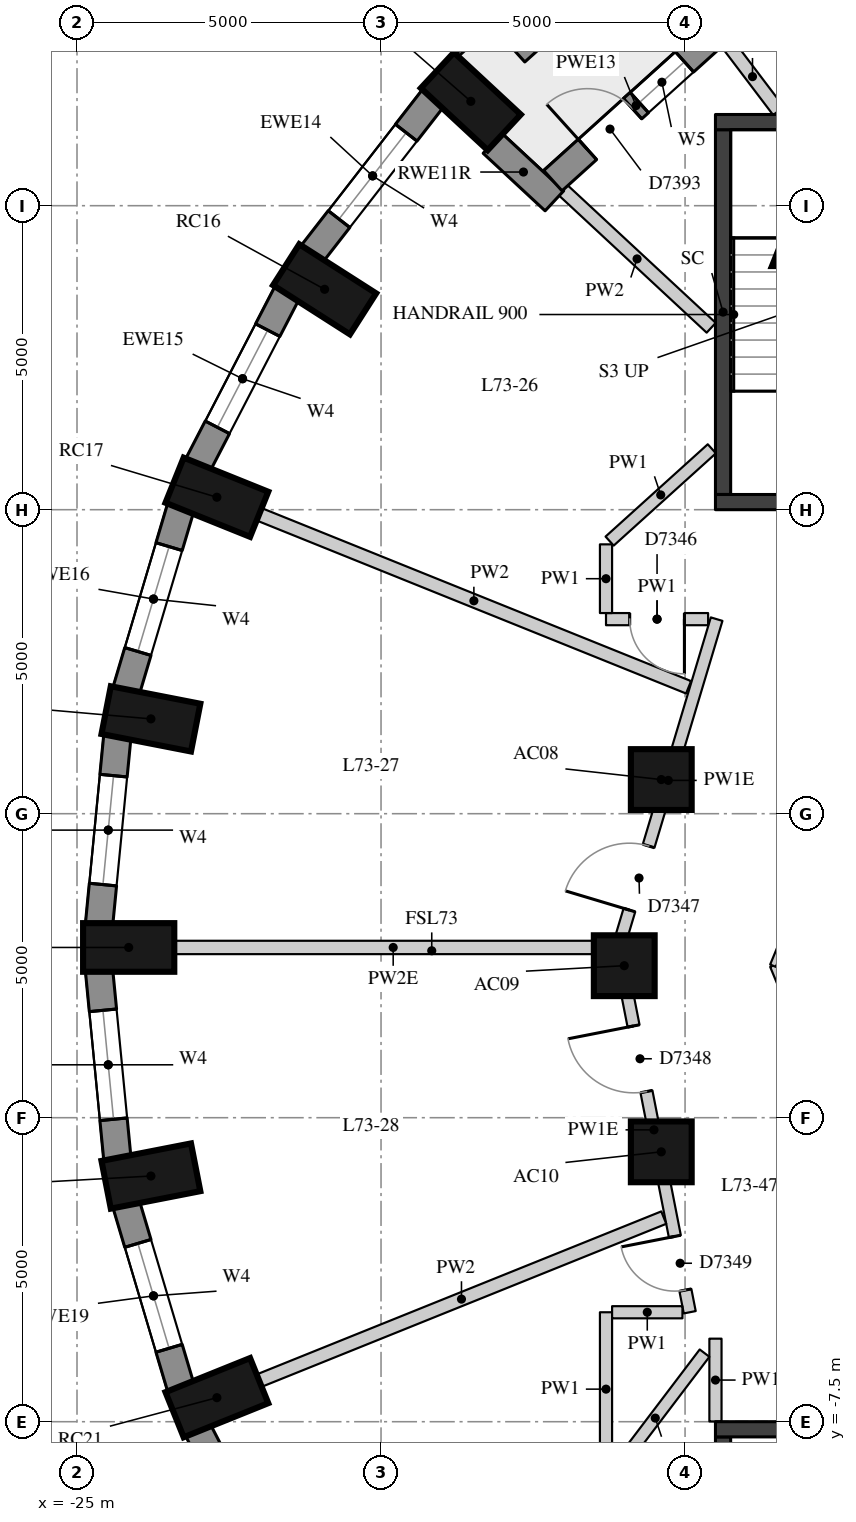
"""IFC4 building model, lengths in metres.
Left out: names, types, materials, properties, quantities, classifications, styles, units other than length and angle.
Written with IfcOpenShell. Run it as: python <this file> out.ifc"""

import sys

from ifc_helpers import new_model, si_unit, direction, frame, frame_2d, origin, origin_2d, place, context, subcontext, project, spatial, rectangle, extrude, element, fill, save


model = new_model("IFC4")
c1 = context("Model", 3, precision=1e-05, world=origin(), true_north=direction((0.0, 1.0)))
c2 = subcontext(c1, "Body", "Model", "MODEL_VIEW")
j1 = project(units=[si_unit("LENGTHUNIT", "METRE"), si_unit("PLANEANGLEUNIT", "RADIAN")], contexts=[c1])
p1 = place(None, origin())
s1 = spatial("IfcSite", under=j1, at=p1, CompositionType="ELEMENT")
p2 = place(p1, origin())
s2 = spatial("IfcBuilding", under=s1, at=p2, CompositionType="ELEMENT")
p3 = place(p2, frame((0.0, 0.0, 256.4)))
s3 = spatial("IfcBuildingStorey", under=s2, at=p3, CompositionType="ELEMENT", Elevation=256.4)
for number, where, z_axis, x_axis in (
    (1, (-18.523, 14.216, 0.0), (0.0, 0.0, 1.0), (-0.733, 0.681, 0.0)),
    (2, (-20.928, 11.125, 0.0), (0.0, 0.0, 1.0), (-0.843, 0.539, 0.0)),
    (3, (-22.7, 7.705, 0.0), (0.0, 0.0, 1.0), (-0.928, 0.374, 0.0)),
    (4, (-23.785, 4.06, 0.0), (0.0, 0.0, 1.0), (-0.981, 0.192, 0.0)),
    (5, (-24.15, 0.3, 0.0), (0.0, 0.0, 1.0), (-1.0, 0.0, 0.0)),
    (6, (-23.785, -3.459, 0.0), (0.0, 0.0, 1.0), (-0.981, -0.192, 0.0)),
    (7, (-22.7, -7.105, 0.0), (0.0, 0.0, 1.0), (-0.928, -0.374, 0.0)),
):
    element("IfcColumn", number, at=place(p3, frame(where, z_axis=z_axis, x_axis=x_axis)), inside=s3, PredefinedType="COLUMN", context=c2, shape_type="SweptSolid", body=[
        extrude(rectangle(XDim=1.5, YDim=0.8, at=origin_2d()), origin(), (0.0, 0.0, 1.0), 3.3),
    ])
for number, where, z_axis, x_axis in (
    (8, (-15.391, 3.062, 0.0), (0.0, 0.0, 1.0), (1.0, 0.0, 0.0)),
    (9, (-16.0, 0.0, 0.0), (0.0, 0.0, 1.0), (1.0, 0.0, 0.0)),
    (10, (-15.391, -3.062, 0.0), (0.0, 0.0, 1.0), (1.0, 0.0, 0.0)),
):
    element("IfcColumn", number, at=place(p3, frame(where, z_axis=z_axis, x_axis=x_axis)), inside=s3, PredefinedType="COLUMN", context=c2, shape_type="SweptSolid", body=[
        extrude(rectangle(XDim=1.0, YDim=1.0, at=origin_2d()), origin(), (0.0, 0.0, 1.0), 3.3),
    ])
p4 = place(p3, frame((-19.142, 14.272, 0.0), z_axis=(0.0, 0.0, 1.0), x_axis=(-0.613862536705, -0.789412937587, 0.0)))
e11 = element("IfcWall", 11, at=p4, inside=s3, PredefinedType="SOLIDWALL", context=c2, shape_type="SweptSolid", body=[
    extrude(rectangle(XDim=3.247, YDim=0.45, at=frame_2d((1.624, 0.0))), origin(), (0.0, 0.0, 1.0), 2.95),
])
p5 = place(p4, frame((0.724, 0.0, 0.4)))
e12 = element("IfcOpeningElement", 12, at=p5, cuts=e11, PredefinedType="OPENING", context=c2, shape_type="SweptSolid", body=[
    extrude(rectangle(XDim=1.8, YDim=1.75, at=frame_2d((0.9, 0.875))), frame((0.0, 0.235, 0.0), z_axis=(0.0, -1.0, 0.0), x_axis=(1.0, 0.0, 0.0)), (0.0, 0.0, 1.0), 0.47),
])
p6 = place(p3, frame((-21.545, 11.068, 0.0), z_axis=(0.0, 0.0, 1.0), x_axis=(-0.459889857669, -0.887975967475, 0.0)))
e13 = element("IfcWall", 13, at=p6, inside=s3, PredefinedType="SOLIDWALL", context=c2, shape_type="SweptSolid", body=[
    extrude(rectangle(XDim=3.186, YDim=0.45, at=frame_2d((1.593, 0.0))), origin(), (0.0, 0.0, 1.0), 2.95),
])
p7 = place(p6, frame((0.693, 0.0, 0.4)))
e14 = element("IfcOpeningElement", 14, at=p7, cuts=e13, PredefinedType="OPENING", context=c2, shape_type="SweptSolid", body=[
    extrude(rectangle(XDim=1.8, YDim=1.75, at=frame_2d((0.9, 0.875))), frame((0.0, 0.235, 0.0), z_axis=(0.0, -1.0, 0.0), x_axis=(1.0, 0.0, 0.0)), (0.0, 0.0, 1.0), 0.47),
])
p8 = place(p3, frame((-23.294, 7.535, 0.0), z_axis=(0.0, 0.0, 1.0), x_axis=(-0.285263800865, -0.958449040855, 0.0)))
e15 = element("IfcWall", 15, at=p8, inside=s3, PredefinedType="SOLIDWALL", context=c2, shape_type="SweptSolid", body=[
    extrude(rectangle(XDim=3.139, YDim=0.45, at=frame_2d((1.57, 0.0))), origin(), (0.0, 0.0, 1.0), 2.95),
])
p9 = place(p8, frame((0.67, 0.0, 0.4)))
e16 = element("IfcOpeningElement", 16, at=p9, cuts=e15, PredefinedType="OPENING", context=c2, shape_type="SweptSolid", body=[
    extrude(rectangle(XDim=1.8, YDim=1.75, at=frame_2d((0.9, 0.875))), frame((0.0, 0.235, 0.0), z_axis=(0.0, -1.0, 0.0), x_axis=(1.0, 0.0, 0.0)), (0.0, 0.0, 1.0), 0.47),
])
p10 = place(p3, frame((-24.336, 3.78, 0.0), z_axis=(0.0, 0.0, 1.0), x_axis=(-0.096740086873, -0.995309678237, 0.0)))
e17 = element("IfcWall", 17, at=p10, inside=s3, PredefinedType="SOLIDWALL", context=c2, shape_type="SweptSolid", body=[
    extrude(rectangle(XDim=3.114, YDim=0.45, at=frame_2d((1.557, 0.0))), origin(), (0.0, 0.0, 1.0), 2.95),
])
p11 = place(p10, frame((0.657, 0.0, 0.4)))
e18 = element("IfcOpeningElement", 18, at=p11, cuts=e17, PredefinedType="OPENING", context=c2, shape_type="SweptSolid", body=[
    extrude(rectangle(XDim=1.8, YDim=1.75, at=frame_2d((0.9, 0.875))), frame((0.0, 0.235, 0.0), z_axis=(0.0, -1.0, 0.0), x_axis=(1.0, 0.0, 0.0)), (0.0, 0.0, 1.0), 0.47),
])
p12 = place(p3, frame((-24.637, -0.08, 0.0), z_axis=(0.0, 0.0, 1.0), x_axis=(0.09673253904, -0.995310411827, 0.0)))
e19 = element("IfcWall", 19, at=p12, inside=s3, PredefinedType="SOLIDWALL", context=c2, shape_type="SweptSolid", body=[
    extrude(rectangle(XDim=3.115, YDim=0.45, at=frame_2d((1.557, 0.0))), origin(), (0.0, 0.0, 1.0), 2.95),
])
p13 = place(p12, frame((0.657, 0.0, 0.4)))
e20 = element("IfcOpeningElement", 20, at=p13, cuts=e19, PredefinedType="OPENING", context=c2, shape_type="SweptSolid", body=[
    extrude(rectangle(XDim=1.8, YDim=1.75, at=frame_2d((0.9, 0.875))), frame((0.0, 0.235, 0.0), z_axis=(0.0, -1.0, 0.0), x_axis=(1.0, 0.0, 0.0)), (0.0, 0.0, 1.0), 0.47),
])
p14 = place(p3, frame((-24.19, -3.926, 0.0), z_axis=(0.0, 0.0, 1.0), x_axis=(0.285263800865, -0.958449040855, 0.0)))
e21 = element("IfcWall", 21, at=p14, inside=s3, PredefinedType="SOLIDWALL", context=c2, shape_type="SweptSolid", body=[
    extrude(rectangle(XDim=3.139, YDim=0.45, at=frame_2d((1.57, 0.0))), origin(), (0.0, 0.0, 1.0), 2.95),
])
p15 = place(p14, frame((0.67, 0.0, 0.4)))
e22 = element("IfcOpeningElement", 22, at=p15, cuts=e21, PredefinedType="OPENING", context=c2, shape_type="SweptSolid", body=[
    extrude(rectangle(XDim=1.8, YDim=1.75, at=frame_2d((0.9, 0.875))), frame((0.0, 0.235, 0.0), z_axis=(0.0, -1.0, 0.0), x_axis=(1.0, 0.0, 0.0)), (0.0, 0.0, 1.0), 0.47),
])
p16 = place(p3, frame((-23.01, -7.64, 0.0), z_axis=(0.0, 0.0, 1.0), x_axis=(0.459921155255, -0.887959757505, 0.0)))
e23 = element("IfcWall", 23, at=p16, inside=s3, PredefinedType="SOLIDWALL", context=c2, shape_type="SweptSolid", body=[
    extrude(rectangle(XDim=3.186, YDim=0.45, at=frame_2d((1.593, 0.0))), origin(), (0.0, 0.0, 1.0), 2.95),
])
p17 = place(p16, frame((0.693, 0.0, 0.4)))
e24 = element("IfcOpeningElement", 24, at=p17, cuts=e23, PredefinedType="OPENING", context=c2, shape_type="SweptSolid", body=[
    extrude(rectangle(XDim=1.8, YDim=1.75, at=frame_2d((0.9, 0.875))), frame((0.0, 0.235, 0.0), z_axis=(0.0, -1.0, 0.0), x_axis=(1.0, 0.0, 0.0)), (0.0, 0.0, 1.0), 0.47),
])
p18 = place(p3, frame((-18.167, 13.527, 0.0), z_axis=(0.0, 0.0, 1.0), x_axis=(0.732693451389, -0.680558819127, 0.0)))
e25 = element("IfcWall", 25, at=p18, inside=s3, PredefinedType="SOLIDWALL", context=c2, shape_type="SweptSolid", body=[
    extrude(rectangle(XDim=1.391, YDim=0.45, at=frame_2d((0.695, 0.0))), origin(), (0.0, 0.0, 1.0), 2.95),
])
p19 = place(p3, frame((-14.441, 15.38, 0.0), z_axis=(0.0, 0.0, 1.0), x_axis=(-0.742152631569, -0.670230909057, 0.0)))
e26 = element("IfcWall", 26, at=p19, inside=s3, PredefinedType="SOLIDWALL", context=c2, shape_type="SweptSolid", body=[
    extrude(rectangle(XDim=3.683, YDim=0.45, at=frame_2d((1.842, 0.0))), origin(), (0.0, 0.0, 1.0), 2.95),
])
p20 = place(p19, frame((0.767, 0.0, 0.4)))
e27 = element("IfcOpeningElement", 27, at=p20, cuts=e26, PredefinedType="OPENING", context=c2, shape_type="SweptSolid", body=[
    extrude(rectangle(XDim=1.0, YDim=1.75, at=frame_2d((0.5, 0.875))), frame((0.0, 0.235, 0.0), z_axis=(0.0, -1.0, 0.0), x_axis=(1.0, 0.0, 0.0)), (0.0, 0.0, 1.0), 0.47),
])
p21 = place(p19, frame((1.917, 0.0, 0.0)))
e28 = element("IfcOpeningElement", 28, at=p21, cuts=e26, PredefinedType="OPENING", context=c2, shape_type="SweptSolid", body=[
    extrude(rectangle(XDim=1.0, YDim=2.15, at=frame_2d((0.5, 1.075))), frame((0.0, 0.235, 0.0), z_axis=(0.0, -1.0, 0.0), x_axis=(1.0, 0.0, 0.0)), (0.0, 0.0, 1.0), 0.47),
])
p22 = place(p3, frame((-16.532, 16.328, 0.0), z_axis=(0.0, 0.0, 1.0), x_axis=(-0.743098542319, -0.669182005439, 0.0)))
e29 = element("IfcWall", 29, at=p22, inside=s3, PredefinedType="USERDEFINED", context=c2, shape_type="SweptSolid", body=[
    extrude(rectangle(XDim=1.8, YDim=0.7, at=frame_2d((0.9, 0.0))), origin(), (0.0, 0.0, 1.0), 0.75),
])
p23 = place(p3, frame((-14.375, 7.75, -0.28), z_axis=(0.0, 0.0, 1.0), x_axis=(0.0, 1.0, 0.0)))
e30 = element("IfcWall", 30, at=p23, inside=s3, PredefinedType="SHEAR", context=c2, shape_type="SweptSolid", body=[
    extrude(rectangle(XDim=6.0, YDim=0.25, at=frame_2d((3.0, 0.0))), origin(), (0.0, 0.0, 1.0), 3.23),
])
for number, where, z_axis, x_axis in (
    (31, (-14.5, 13.875, -0.28), (0.0, 0.0, 1.0), (1.0, 0.0, 0.0)),
    (32, (-14.5, 7.625, -0.28), (0.0, 0.0, 1.0), (1.0, 0.0, 0.0)),
):
    element("IfcWall", number, at=place(p3, frame(where, z_axis=z_axis, x_axis=x_axis)), inside=s3, PredefinedType="SHEAR", context=c2, shape_type="SweptSolid", body=[
        extrude(rectangle(XDim=5.2, YDim=0.25, at=frame_2d((2.6, 0.0))), origin(), (0.0, 0.0, 1.0), 3.23),
    ])
p24 = place(p3, frame((-14.375, -13.75, -0.28), z_axis=(0.0, 0.0, 1.0), x_axis=(0.0, 1.0, 0.0)))
e33 = element("IfcWall", 33, at=p24, inside=s3, PredefinedType="SHEAR", context=c2, shape_type="SweptSolid", body=[
    extrude(rectangle(XDim=6.0, YDim=0.25, at=frame_2d((3.0, 0.0))), origin(), (0.0, 0.0, 1.0), 3.23),
])
p25 = place(p3, frame((-14.5, -7.625, -0.28), z_axis=(0.0, 0.0, 1.0), x_axis=(1.0, 0.0, 0.0)))
e34 = element("IfcWall", 34, at=p25, inside=s3, PredefinedType="SHEAR", context=c2, shape_type="SweptSolid", body=[
    extrude(rectangle(XDim=5.2, YDim=0.25, at=frame_2d((2.6, 0.0))), origin(), (0.0, 0.0, 1.0), 3.23),
])
p26 = place(p3, frame((-14.923, -5.7, 0.0), z_axis=(0.0, 0.0, 1.0), x_axis=(-0.192536596074, 0.981289793676, 0.0)))
e35 = element("IfcWall", 35, at=p26, inside=s3, PredefinedType="PARTITIONING", context=c2, shape_type="SweptSolid", body=[
    extrude(rectangle(XDim=6.115, YDim=0.2, at=frame_2d((3.057, 0.0))), origin(), (0.0, 0.0, 1.0), 2.45),
])
p27 = place(p26, frame((3.699, 0.0, 0.0)))
e36 = element("IfcOpeningElement", 36, at=p27, cuts=e35, PredefinedType="OPENING", context=c2, shape_type="SweptSolid", body=[
    extrude(rectangle(XDim=1.1, YDim=2.1, at=frame_2d((0.55, 1.05))), frame((0.0, 0.11, 0.0), z_axis=(0.0, -1.0, 0.0), x_axis=(1.0, 0.0, 0.0)), (0.0, 0.0, 1.0), 0.22),
])
p28 = place(p26, frame((0.372, 0.0, 0.0)))
e37 = element("IfcOpeningElement", 37, at=p28, cuts=e35, PredefinedType="OPENING", context=c2, shape_type="SweptSolid", body=[
    extrude(rectangle(XDim=0.9, YDim=2.1, at=frame_2d((0.45, 1.05))), frame((0.0, 0.11, 0.0), z_axis=(0.0, -1.0, 0.0), x_axis=(1.0, 0.0, 0.0)), (0.0, 0.0, 1.0), 0.22),
])
p29 = place(p3, frame((-16.071, 0.395, 0.0), z_axis=(0.0, 0.0, 1.0), x_axis=(0.287129472402, 0.957891782029, 0.0)))
e38 = element("IfcWall", 38, at=p29, inside=s3, PredefinedType="PARTITIONING", context=c2, shape_type="SweptSolid", body=[
    extrude(rectangle(XDim=5.538, YDim=0.2, at=frame_2d((2.769, 0.0))), origin(), (0.0, 0.0, 1.0), 2.45),
])
p30 = place(p29, frame((0.543, 0.0, 0.0)))
e39 = element("IfcOpeningElement", 39, at=p30, cuts=e38, PredefinedType="OPENING", context=c2, shape_type="SweptSolid", body=[
    extrude(rectangle(XDim=1.1, YDim=2.1, at=frame_2d((0.55, 1.05))), frame((0.0, 0.11, 0.0), z_axis=(0.0, -1.0, 0.0), x_axis=(1.0, 0.0, 0.0)), (0.0, 0.0, 1.0), 0.22),
])
p31 = place(p3, frame((-14.621, 5.7, 0.0), z_axis=(0.0, 0.0, 1.0), x_axis=(-1.0, 0.0, 0.0)))
e40 = element("IfcWall", 40, at=p31, inside=s3, PredefinedType="PARTITIONING", context=c2, shape_type="SweptSolid", body=[
    extrude(rectangle(XDim=1.679, YDim=0.2, at=frame_2d((0.84, 0.0))), origin(), (0.0, 0.0, 1.0), 2.95),
])
p32 = place(p31, frame((0.39, 0.0, 0.0)))
e41 = element("IfcOpeningElement", 41, at=p32, cuts=e40, PredefinedType="OPENING", context=c2, shape_type="SweptSolid", body=[
    extrude(rectangle(XDim=0.9, YDim=2.1, at=frame_2d((0.45, 1.05))), frame((0.0, 0.11, 0.0), z_axis=(0.0, -1.0, 0.0), x_axis=(1.0, 0.0, 0.0)), (0.0, 0.0, 1.0), 0.22),
])
p33 = place(p3, frame((-16.3, 5.8, 0.0), z_axis=(0.0, 0.0, 1.0), x_axis=(0.0, 1.0, 0.0)))
e42 = element("IfcWall", 42, at=p33, inside=s3, PredefinedType="PARTITIONING", context=c2, shape_type="SweptSolid", body=[
    extrude(rectangle(XDim=1.13, YDim=0.2, at=frame_2d((0.565, 0.0))), origin(), (0.0, 0.0, 1.0), 2.95),
])
p34 = place(p3, frame((-16.24, 6.984, 0.0), z_axis=(0.0, 0.0, 1.0), x_axis=(0.742140692687, 0.67024412885, 0.0)))
e43 = element("IfcWall", 43, at=p34, inside=s3, PredefinedType="PARTITIONING", context=c2, shape_type="SweptSolid", body=[
    extrude(rectangle(XDim=2.265, YDim=0.2, at=frame_2d((1.132, 0.0))), origin(), (0.0, 0.0, 1.0), 2.95),
])
p35 = place(p3, frame((-14.5, -7.496, 0.0), z_axis=(0.0, 0.0, 1.0), x_axis=(0.0, 1.0, 0.0)))
e44 = element("IfcWall", 44, at=p35, inside=s3, PredefinedType="PARTITIONING", context=c2, shape_type="SweptSolid", body=[
    extrude(rectangle(XDim=1.362, YDim=0.2, at=frame_2d((0.681, 0.0))), origin(), (0.0, 0.0, 1.0), 2.95),
])
p36 = place(p3, frame((-14.679, -6.372, 0.0), z_axis=(0.0, 0.0, 1.0), x_axis=(-0.604258962547, -0.796787993247, 0.0)))
e45 = element("IfcWall", 45, at=p36, inside=s3, PredefinedType="PARTITIONING", context=c2, shape_type="SweptSolid", body=[
    extrude(rectangle(XDim=2.682, YDim=0.2, at=frame_2d((1.341, 0.0))), origin(), (0.0, 0.0, 1.0), 2.95),
])
p37 = place(p3, frame((-16.3, -8.229, 0.0), z_axis=(0.0, 0.0, 1.0), x_axis=(0.0, 1.0, 0.0)))
e46 = element("IfcWall", 46, at=p37, inside=s3, PredefinedType="PARTITIONING", context=c2, shape_type="SweptSolid", body=[
    extrude(rectangle(XDim=2.529, YDim=0.2, at=frame_2d((1.265, 0.0))), origin(), (0.0, 0.0, 1.0), 2.95),
])
p38 = place(p3, frame((-16.2, -5.7, 0.0), z_axis=(0.0, 0.0, 1.0), x_axis=(1.0, 0.0, 0.0)))
e47 = element("IfcWall", 47, at=p38, inside=s3, PredefinedType="PARTITIONING", context=c2, shape_type="SweptSolid", body=[
    extrude(rectangle(XDim=1.157, YDim=0.2, at=frame_2d((0.579, 0.0))), origin(), (0.0, 0.0, 1.0), 2.95),
])
p39 = place(p3, frame((-14.319, 15.187, 0.0), z_axis=(0.0, 0.0, 1.0), x_axis=(0.603937349714, -0.797031792101, 0.0)))
e48 = element("IfcWall", 48, at=p39, inside=s3, PredefinedType="PARTITIONING", context=c2, shape_type="SweptSolid", body=[
    extrude(rectangle(XDim=1.416, YDim=0.22, at=frame_2d((0.708, 0.0))), origin(), (0.0, 0.0, 1.0), 2.5),
])
p40 = place(p3, frame((-17.009, 12.758, 0.0), z_axis=(0.0, 0.0, 1.0), x_axis=(0.732631495403, -0.680625515202, 0.0)))
e49 = element("IfcWall", 49, at=p40, inside=s3, PredefinedType="PARTITIONING", context=c2, shape_type="SweptSolid", body=[
    extrude(rectangle(XDim=3.328, YDim=0.22, at=frame_2d((1.664, 0.0))), origin(), (0.0, 0.0, 1.0), 2.95),
])
p41 = place(p3, frame((-22.004, 7.424, 0.0), z_axis=(0.0, 0.0, 1.0), x_axis=(0.927533826991, -0.373739213607, 0.0)))
e50 = element("IfcWall", 50, at=p41, inside=s3, PredefinedType="PARTITIONING", context=c2, shape_type="SweptSolid", body=[
    extrude(rectangle(XDim=7.614, YDim=0.22, at=frame_2d((3.807, 0.0))), origin(), (0.0, 0.0, 1.0), 2.95),
])
p42 = place(p3, frame((-23.4, 0.3, 0.0), z_axis=(0.0, 0.0, 1.0), x_axis=(1.0, 0.0, 0.0)))
e51 = element("IfcWall", 51, at=p42, inside=s3, PredefinedType="PARTITIONING", context=c2, shape_type="SweptSolid", body=[
    extrude(rectangle(XDim=7.2, YDim=0.22, at=frame_2d((3.6, 0.0))), origin(), (0.0, 0.0, 1.0), 2.4),
])
p43 = place(p3, frame((-22.004, -6.824, 0.0), z_axis=(0.0, 0.0, 1.0), x_axis=(0.927530164265, 0.373748303513, 0.0)))
e52 = element("IfcWall", 52, at=p43, inside=s3, PredefinedType="PARTITIONING", context=c2, shape_type="SweptSolid", body=[
    extrude(rectangle(XDim=7.174, YDim=0.22, at=frame_2d((3.587, 0.0))), origin(), (0.0, 0.0, 1.0), 2.95),
])
for number, where, z_axis, x_axis in (
    (53, (-11.927, -3.927, 0.0), (0.0, 0.0, 1.0), (-0.383, 0.924, 0.0)),
    (54, (-13.554, 0.0, 0.0), (0.0, 0.0, 1.0), (0.383, 0.924, 0.0)),
):
    element("IfcWall", number, at=place(p3, frame(where, z_axis=z_axis, x_axis=x_axis)), inside=s3, PredefinedType="PARTITIONING", context=c2, shape_type="SweptSolid", body=[
        extrude(rectangle(XDim=4.251, YDim=0.1, at=frame_2d((2.125, 0.0))), origin(), (0.0, 0.0, 1.0), 2.95),
    ])
p44 = place(p5, origin())
e55 = element("IfcWindow", 55, at=p44, inside=s3, PartitioningType="SINGLE_PANEL", PredefinedType="WINDOW", context=c2, shape_type="SweptSolid", body=[
    extrude(rectangle(XDim=1.8, YDim=1.75, at=frame_2d((0.9, 0.875))), frame((0.0, 0.035, 0.0), z_axis=(0.0, -1.0, 0.0), x_axis=(1.0, 0.0, 0.0)), (0.0, 0.0, 1.0), 0.06),
])
fill(e12, e55)
p45 = place(p7, origin())
e56 = element("IfcWindow", 56, at=p45, inside=s3, PartitioningType="SINGLE_PANEL", PredefinedType="WINDOW", context=c2, shape_type="SweptSolid", body=[
    extrude(rectangle(XDim=1.8, YDim=1.75, at=frame_2d((0.9, 0.875))), frame((0.0, 0.035, 0.0), z_axis=(0.0, -1.0, 0.0), x_axis=(1.0, 0.0, 0.0)), (0.0, 0.0, 1.0), 0.06),
])
fill(e14, e56)
p46 = place(p9, origin())
e57 = element("IfcWindow", 57, at=p46, inside=s3, PartitioningType="SINGLE_PANEL", PredefinedType="WINDOW", context=c2, shape_type="SweptSolid", body=[
    extrude(rectangle(XDim=1.8, YDim=1.75, at=frame_2d((0.9, 0.875))), frame((0.0, 0.035, 0.0), z_axis=(0.0, -1.0, 0.0), x_axis=(1.0, 0.0, 0.0)), (0.0, 0.0, 1.0), 0.06),
])
fill(e16, e57)
p47 = place(p11, origin())
e58 = element("IfcWindow", 58, at=p47, inside=s3, PartitioningType="SINGLE_PANEL", PredefinedType="WINDOW", context=c2, shape_type="SweptSolid", body=[
    extrude(rectangle(XDim=1.8, YDim=1.75, at=frame_2d((0.9, 0.875))), frame((0.0, 0.035, 0.0), z_axis=(0.0, -1.0, 0.0), x_axis=(1.0, 0.0, 0.0)), (0.0, 0.0, 1.0), 0.06),
])
fill(e18, e58)
p48 = place(p13, origin())
e59 = element("IfcWindow", 59, at=p48, inside=s3, PartitioningType="SINGLE_PANEL", PredefinedType="WINDOW", context=c2, shape_type="SweptSolid", body=[
    extrude(rectangle(XDim=1.8, YDim=1.75, at=frame_2d((0.9, 0.875))), frame((0.0, 0.035, 0.0), z_axis=(0.0, -1.0, 0.0), x_axis=(1.0, 0.0, 0.0)), (0.0, 0.0, 1.0), 0.06),
])
fill(e20, e59)
p49 = place(p15, origin())
e60 = element("IfcWindow", 60, at=p49, inside=s3, PartitioningType="SINGLE_PANEL", PredefinedType="WINDOW", context=c2, shape_type="SweptSolid", body=[
    extrude(rectangle(XDim=1.8, YDim=1.75, at=frame_2d((0.9, 0.875))), frame((0.0, 0.035, 0.0), z_axis=(0.0, -1.0, 0.0), x_axis=(1.0, 0.0, 0.0)), (0.0, 0.0, 1.0), 0.06),
])
fill(e22, e60)
p50 = place(p20, origin())
e61 = element("IfcWindow", 61, at=p50, inside=s3, PartitioningType="SINGLE_PANEL", PredefinedType="WINDOW", context=c2, shape_type="SweptSolid", body=[
    extrude(rectangle(XDim=1.0, YDim=1.75, at=frame_2d((0.5, 0.875))), frame((0.0, 0.035, 0.0), z_axis=(0.0, -1.0, 0.0), x_axis=(1.0, 0.0, 0.0)), (0.0, 0.0, 1.0), 0.06),
])
fill(e27, e61)
p51 = place(p21, origin())
e62 = element("IfcDoor", 62, at=p51, inside=s3, OperationType="SINGLE_SWING_LEFT", PredefinedType="DOOR", context=c2, shape_type="SweptSolid", body=[
    extrude(rectangle(XDim=1.0, YDim=2.15, at=frame_2d((0.5, 1.075))), frame((0.0, -0.025, 0.0), z_axis=(0.0, -1.0, 0.0), x_axis=(1.0, 0.0, 0.0)), (0.0, 0.0, 1.0), 0.05),
])
fill(e28, e62)
p52 = place(p32, origin())
e63 = element("IfcDoor", 63, at=p52, inside=s3, OperationType="SINGLE_SWING_LEFT", PredefinedType="DOOR", context=c2, shape_type="SweptSolid", body=[
    extrude(rectangle(XDim=0.9, YDim=2.1, at=frame_2d((0.45, 1.05))), frame((0.0, 0.025, 0.0), z_axis=(0.0, -1.0, 0.0), x_axis=(1.0, 0.0, 0.0)), (0.0, 0.0, 1.0), 0.05),
])
fill(e41, e63)
p53 = place(p30, origin())
e64 = element("IfcDoor", 64, at=p53, inside=s3, OperationType="SINGLE_SWING_LEFT", PredefinedType="DOOR", context=c2, shape_type="SweptSolid", body=[
    extrude(rectangle(XDim=1.1, YDim=2.1, at=frame_2d((0.55, 1.05))), frame((0.0, 0.025, 0.0), z_axis=(0.0, -1.0, 0.0), x_axis=(1.0, 0.0, 0.0)), (0.0, 0.0, 1.0), 0.05),
])
fill(e39, e64)
p54 = place(p27, origin())
e65 = element("IfcDoor", 65, at=p54, inside=s3, OperationType="SINGLE_SWING_RIGHT", PredefinedType="DOOR", context=c2, shape_type="SweptSolid", body=[
    extrude(rectangle(XDim=1.1, YDim=2.1, at=frame_2d((0.55, 1.05))), frame((0.0, 0.025, 0.0), z_axis=(0.0, -1.0, 0.0), x_axis=(1.0, 0.0, 0.0)), (0.0, 0.0, 1.0), 0.05),
])
fill(e36, e65)
p55 = place(p28, origin())
e66 = element("IfcDoor", 66, at=p55, inside=s3, OperationType="SINGLE_SWING_RIGHT", PredefinedType="DOOR", context=c2, shape_type="SweptSolid", body=[
    extrude(rectangle(XDim=0.9, YDim=2.1, at=frame_2d((0.45, 1.05))), frame((0.0, 0.025, 0.0), z_axis=(0.0, -1.0, 0.0), x_axis=(1.0, 0.0, 0.0)), (0.0, 0.0, 1.0), 0.05),
])
fill(e37, e66)
save(model, sys.argv[1])
